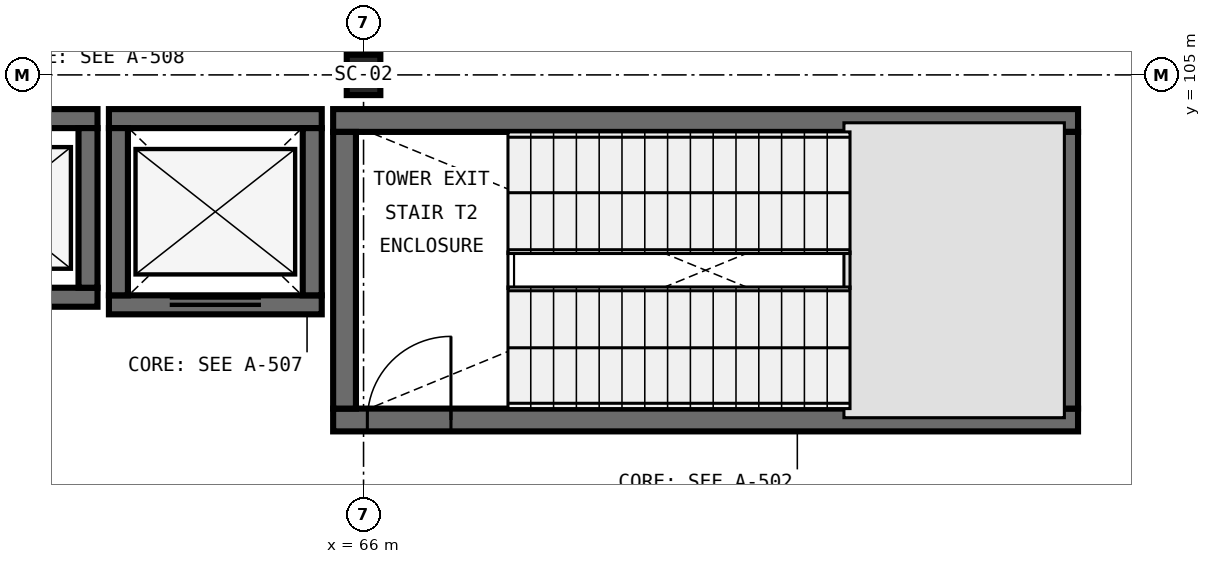
"""IFC4 building model, lengths in metres.
Left out: names, types, materials, properties, quantities, classifications, styles, units other than length and angle.
Written with IfcOpenShell. Run it as: python <this file> out.ifc"""

import sys

from ifc_helpers import new_model, si_unit, direction, frame, frame_2d, origin, origin_2d, place, context, subcontext, project, spatial, rectangle, i_section, extrude, element, fill, save


model = new_model("IFC4")
c1 = context("Model", 3, precision=1e-05, world=origin(), true_north=direction((0.0, 1.0)))
c2 = subcontext(c1, "Body", "Model", "MODEL_VIEW")
j1 = project(units=[si_unit("LENGTHUNIT", "METRE"), si_unit("PLANEANGLEUNIT", "RADIAN")], contexts=[c1])
p1 = place(None, origin())
s1 = spatial("IfcSite", under=j1, at=p1, CompositionType="ELEMENT")
p2 = place(p1, origin())
s2 = spatial("IfcBuilding", under=s1, at=p2, CompositionType="ELEMENT")
p3 = place(p2, frame((0.0, 0.0, 18.0)))
s3 = spatial("IfcBuildingStorey", under=s2, at=p3, CompositionType="ELEMENT", Elevation=18.0)
p4 = place(p3, frame((66.0, 105.0, 0.0), z_axis=(0.0, 0.0, 1.0), x_axis=(1.0, 0.0, 0.0)))
e1 = element("IfcColumn", 1, at=p4, inside=s3, PredefinedType="COLUMN", context=c2, shape_type="SweptSolid", body=[
    extrude(i_section(OverallWidth=0.442, OverallDepth=0.531, WebThickness=0.066, FlangeThickness=0.106, FilletRadius=0.031, at=origin_2d()), origin(), (0.0, 0.0, 1.0), 5.4),
])
p5 = place(p3, frame((65.6, 100.46, 0.0), z_axis=(0.0, 0.0, 1.0), x_axis=(1.0, 0.0, 0.0)))
e2 = element("IfcWall", 2, at=p5, inside=s3, PredefinedType="SHEAR", context=c2, shape_type="SweptSolid", body=[
    extrude(rectangle(XDim=9.8, YDim=0.3, at=frame_2d((4.9, 0.0))), origin(), (0.0, 0.0, 1.0), 5.4),
])
p6 = place(p5, frame((0.45, 0.0, 0.0)))
e3 = element("IfcOpeningElement", 3, at=p6, cuts=e2, PredefinedType="OPENING", context=c2, shape_type="SweptSolid", body=[
    extrude(rectangle(XDim=1.1, YDim=2.2, at=frame_2d((0.55, 1.1))), frame((0.0, 0.165, 0.0), z_axis=(0.0, -1.0, 0.0), x_axis=(1.0, 0.0, 0.0)), (0.0, 0.0, 1.0), 0.33),
])
p7 = place(p3, frame((75.4, 104.4, 0.0), z_axis=(0.0, 0.0, 1.0), x_axis=(-1.0, 0.0, 0.0)))
e4 = element("IfcWall", 4, at=p7, inside=s3, PredefinedType="SHEAR", context=c2, shape_type="SweptSolid", body=[
    extrude(rectangle(XDim=9.8, YDim=0.3, at=frame_2d((4.9, 0.0))), origin(), (0.0, 0.0, 1.0), 5.4),
])
for number, where, z_axis, x_axis in (
    (5, (65.75, 104.25, 0.0), (0.0, 0.0, 1.0), (0.0, -1.0, 0.0)),
    (6, (75.25, 100.61, 0.0), (0.0, 0.0, 1.0), (0.0, 1.0, 0.0)),
):
    element("IfcWall", number, at=place(p3, frame(where, z_axis=z_axis, x_axis=x_axis)), inside=s3, PredefinedType="SHEAR", context=c2, shape_type="SweptSolid", body=[
        extrude(rectangle(XDim=3.64, YDim=0.3, at=frame_2d((1.82, 0.0))), origin(), (0.0, 0.0, 1.0), 5.4),
    ])
p8 = place(p3, frame((62.65, 101.975, 0.0), z_axis=(0.0, 0.0, 1.0), x_axis=(1.0, 0.0, 0.0)))
e7 = element("IfcWall", 7, at=p8, inside=s3, PredefinedType="SHEAR", context=c2, shape_type="SweptSolid", body=[
    extrude(rectangle(XDim=2.8, YDim=0.25, at=frame_2d((1.4, 0.0))), origin(), (0.0, 0.0, 1.0), 5.4),
])
p9 = place(p8, frame((0.8, 0.0, 0.0)))
e8 = element("IfcOpeningElement", 8, at=p9, cuts=e7, PredefinedType="OPENING", context=c2, shape_type="SweptSolid", body=[
    extrude(rectangle(XDim=1.2, YDim=2.2, at=frame_2d((0.6, 1.1))), frame((0.0, 0.14, 0.0), z_axis=(0.0, -1.0, 0.0), x_axis=(1.0, 0.0, 0.0)), (0.0, 0.0, 1.0), 0.28),
])
p10 = place(p3, frame((65.45, 104.425, 0.0), z_axis=(0.0, 0.0, 1.0), x_axis=(-1.0, 0.0, 0.0)))
e9 = element("IfcWall", 9, at=p10, inside=s3, PredefinedType="SHEAR", context=c2, shape_type="SweptSolid", body=[
    extrude(rectangle(XDim=2.8, YDim=0.25, at=frame_2d((1.4, 0.0))), origin(), (0.0, 0.0, 1.0), 5.4),
])
for number, where, z_axis, x_axis in (
    (10, (62.775, 104.3, 0.0), (0.0, 0.0, 1.0), (0.0, -1.0, 0.0)),
    (11, (65.325, 102.1, 0.0), (0.0, 0.0, 1.0), (0.0, 1.0, 0.0)),
):
    element("IfcWall", number, at=place(p3, frame(where, z_axis=z_axis, x_axis=x_axis)), inside=s3, PredefinedType="SHEAR", context=c2, shape_type="SweptSolid", body=[
        extrude(rectangle(XDim=2.2, YDim=0.25, at=frame_2d((1.1, 0.0))), origin(), (0.0, 0.0, 1.0), 5.4),
    ])
p11 = place(p3, frame((59.8, 102.075, 0.0), z_axis=(0.0, 0.0, 1.0), x_axis=(1.0, 0.0, 0.0)))
e12 = element("IfcWall", 12, at=p11, inside=s3, PredefinedType="SHEAR", context=c2, shape_type="SweptSolid", body=[
    extrude(rectangle(XDim=2.7, YDim=0.25, at=frame_2d((1.35, 0.0))), origin(), (0.0, 0.0, 1.0), 5.4),
])
p12 = place(p11, frame((0.8, 0.0, 0.0)))
e13 = element("IfcOpeningElement", 13, at=p12, cuts=e12, PredefinedType="OPENING", context=c2, shape_type="SweptSolid", body=[
    extrude(rectangle(XDim=1.1, YDim=2.2, at=frame_2d((0.55, 1.1))), frame((0.0, 0.14, 0.0), z_axis=(0.0, -1.0, 0.0), x_axis=(1.0, 0.0, 0.0)), (0.0, 0.0, 1.0), 0.28),
])
p13 = place(p3, frame((62.5, 104.425, 0.0), z_axis=(0.0, 0.0, 1.0), x_axis=(-1.0, 0.0, 0.0)))
e14 = element("IfcWall", 14, at=p13, inside=s3, PredefinedType="SHEAR", context=c2, shape_type="SweptSolid", body=[
    extrude(rectangle(XDim=2.7, YDim=0.25, at=frame_2d((1.35, 0.0))), origin(), (0.0, 0.0, 1.0), 5.4),
])
p14 = place(p3, frame((62.375, 102.2, 0.0), z_axis=(0.0, 0.0, 1.0), x_axis=(0.0, 1.0, 0.0)))
e15 = element("IfcWall", 15, at=p14, inside=s3, PredefinedType="SHEAR", context=c2, shape_type="SweptSolid", body=[
    extrude(rectangle(XDim=2.1, YDim=0.25, at=frame_2d((1.05, 0.0))), origin(), (0.0, 0.0, 1.0), 5.4),
])
p15 = place(p6, origin())
e16 = element("IfcDoor", 16, at=p15, inside=s3, OperationType="SINGLE_SWING_RIGHT", PredefinedType="DOOR", context=c2, shape_type="SweptSolid", body=[
    extrude(rectangle(XDim=1.1, YDim=2.2, at=frame_2d((0.55, 1.1))), frame((0.0, 0.025, 0.0), z_axis=(0.0, -1.0, 0.0), x_axis=(1.0, 0.0, 0.0)), (0.0, 0.0, 1.0), 0.05),
])
fill(e3, e16)
p16 = place(p9, origin())
e17 = element("IfcDoor", 17, at=p16, inside=s3, OperationType="DOUBLE_DOOR_SLIDING", PredefinedType="DOOR", context=c2, shape_type="SweptSolid", body=[
    extrude(rectangle(XDim=1.2, YDim=2.2, at=frame_2d((0.6, 1.1))), frame((0.0, 0.025, 0.0), z_axis=(0.0, -1.0, 0.0), x_axis=(1.0, 0.0, 0.0)), (0.0, 0.0, 1.0), 0.05),
])
fill(e8, e17)
save(model, sys.argv[1])
